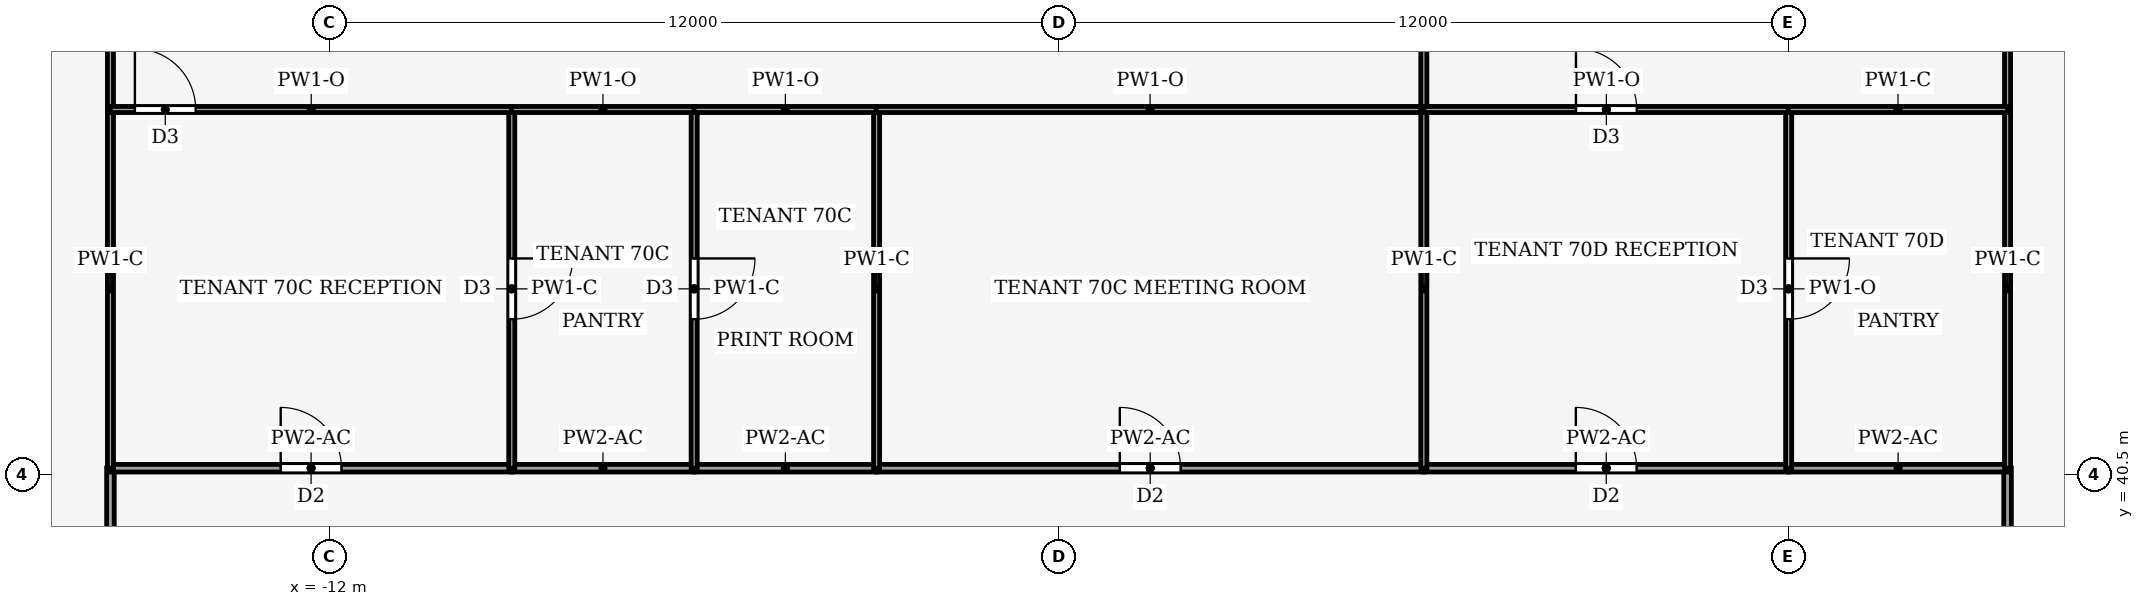
"""IFC4 building model, lengths in metres.
Left out: names, types, materials, properties, quantities, classifications, styles, units other than length and angle.
Written with IfcOpenShell. Run it as: python <this file> out.ifc"""

import sys

from ifc_helpers import new_model, si_unit, direction, frame, frame_2d, origin, place, context, subcontext, project, spatial, rectangle, extrude, element, fill, save


model = new_model("IFC4")
c1 = context("Model", 3, precision=1e-05, world=origin(), true_north=direction((0.0, 1.0)))
c2 = subcontext(c1, "Body", "Model", "MODEL_VIEW")
j1 = project(units=[si_unit("LENGTHUNIT", "METRE"), si_unit("PLANEANGLEUNIT", "RADIAN")], contexts=[c1])
p1 = place(None, origin())
s1 = spatial("IfcSite", under=j1, at=p1, CompositionType="ELEMENT")
p2 = place(p1, origin())
s2 = spatial("IfcBuilding", under=s1, at=p2, CompositionType="ELEMENT")
p3 = place(p2, frame((0.0, 0.0, 306.0)))
s3 = spatial("IfcBuildingStorey", under=s2, at=p3, CompositionType="ELEMENT", Elevation=306.0)
p4 = place(p3, frame((-15.6, 34.5, 0.0), z_axis=(0.0, 0.0, 1.0), x_axis=(0.0, 1.0, 0.0)))
e1 = element("IfcWall", 1, at=p4, inside=s3, PredefinedType="PARTITIONING", context=c2, shape_type="SweptSolid", body=[
    extrude(rectangle(XDim=6.104, YDim=0.125, at=frame_2d((3.052, 0.0))), origin(), (0.0, 0.0, 1.0), 3.14),
])
p5 = place(p4, frame((2.552, 0.0, 0.0)))
e2 = element("IfcOpeningElement", 2, at=p5, cuts=e1, PredefinedType="OPENING", context=c2, shape_type="SweptSolid", body=[
    extrude(rectangle(XDim=1.0, YDim=2.1, at=frame_2d((0.5, 1.05))), frame((0.0, 0.073, 0.0), z_axis=(0.0, -1.0, 0.0), x_axis=(1.0, 0.0, 0.0)), (0.0, 0.0, 1.0), 0.145),
])
p6 = place(p3, frame((15.6, 40.604, 0.0), z_axis=(0.0, 0.0, 1.0), x_axis=(0.0, -1.0, 0.0)))
e3 = element("IfcWall", 3, at=p6, inside=s3, PredefinedType="PARTITIONING", context=c2, shape_type="SweptSolid", body=[
    extrude(rectangle(XDim=6.104, YDim=0.125, at=frame_2d((3.052, 0.0))), origin(), (0.0, 0.0, 1.0), 3.14),
])
p7 = place(p6, frame((2.552, 0.0, 0.0)))
e4 = element("IfcOpeningElement", 4, at=p7, cuts=e3, PredefinedType="OPENING", context=c2, shape_type="SweptSolid", body=[
    extrude(rectangle(XDim=1.0, YDim=2.1, at=frame_2d((0.5, 1.05))), frame((0.0, 0.073, 0.0), z_axis=(0.0, -1.0, 0.0), x_axis=(1.0, 0.0, 0.0)), (0.0, 0.0, 1.0), 0.145),
])
p8 = place(p3, frame((-15.6, 40.6, 0.0), z_axis=(0.0, 0.0, 1.0), x_axis=(1.0, 0.0, 0.0)))
e5 = element("IfcWall", 5, at=p8, inside=s3, PredefinedType="PARTITIONING", context=c2, shape_type="SweptSolid", body=[
    extrude(rectangle(XDim=6.6, YDim=0.125, at=frame_2d((3.3, 0.0))), origin(), (0.0, 0.0, 1.0), 3.39),
])
p9 = place(p8, frame((2.8, 0.0, 0.0)))
e6 = element("IfcOpeningElement", 6, at=p9, cuts=e5, PredefinedType="OPENING", context=c2, shape_type="SweptSolid", body=[
    extrude(rectangle(XDim=1.0, YDim=2.1, at=frame_2d((0.5, 1.05))), frame((0.0, 0.073, 0.0), z_axis=(0.0, -1.0, 0.0), x_axis=(1.0, 0.0, 0.0)), (0.0, 0.0, 1.0), 0.145),
])
for number, where, z_axis, x_axis in (
    (7, (-6.0, 40.6, 0.0), (0.0, 0.0, 1.0), (-1.0, 0.0, 0.0)),
    (8, (-3.0, 40.6, 0.0), (0.0, 0.0, 1.0), (-1.0, 0.0, 0.0)),
):
    element("IfcWall", number, at=place(p3, frame(where, z_axis=z_axis, x_axis=x_axis)), inside=s3, PredefinedType="PARTITIONING", context=c2, shape_type="SweptSolid", body=[
        extrude(rectangle(XDim=3.0, YDim=0.125, at=frame_2d((1.5, 0.0))), origin(), (0.0, 0.0, 1.0), 3.39),
    ])
p10 = place(p3, frame((-3.0, 40.6, 0.0), z_axis=(0.0, 0.0, 1.0), x_axis=(1.0, 0.0, 0.0)))
e9 = element("IfcWall", 9, at=p10, inside=s3, PredefinedType="PARTITIONING", context=c2, shape_type="SweptSolid", body=[
    extrude(rectangle(XDim=9.0, YDim=0.125, at=frame_2d((4.5, 0.0))), origin(), (0.0, 0.0, 1.0), 3.39),
])
p11 = place(p10, frame((4.0, 0.0, 0.0)))
e10 = element("IfcOpeningElement", 10, at=p11, cuts=e9, PredefinedType="OPENING", context=c2, shape_type="SweptSolid", body=[
    extrude(rectangle(XDim=1.0, YDim=2.1, at=frame_2d((0.5, 1.05))), frame((0.0, 0.073, 0.0), z_axis=(0.0, -1.0, 0.0), x_axis=(1.0, 0.0, 0.0)), (0.0, 0.0, 1.0), 0.145),
])
p12 = place(p3, frame((6.0, 40.6, 0.0), z_axis=(0.0, 0.0, 1.0), x_axis=(1.0, 0.0, 0.0)))
e11 = element("IfcWall", 11, at=p12, inside=s3, PredefinedType="PARTITIONING", context=c2, shape_type="SweptSolid", body=[
    extrude(rectangle(XDim=6.0, YDim=0.125, at=frame_2d((3.0, 0.0))), origin(), (0.0, 0.0, 1.0), 3.39),
])
p13 = place(p12, frame((2.5, 0.0, 0.0)))
e12 = element("IfcOpeningElement", 12, at=p13, cuts=e11, PredefinedType="OPENING", context=c2, shape_type="SweptSolid", body=[
    extrude(rectangle(XDim=1.0, YDim=2.1, at=frame_2d((0.5, 1.05))), frame((0.0, 0.073, 0.0), z_axis=(0.0, -1.0, 0.0), x_axis=(1.0, 0.0, 0.0)), (0.0, 0.0, 1.0), 0.145),
])
p14 = place(p3, frame((15.6, 40.6, 0.0), z_axis=(0.0, 0.0, 1.0), x_axis=(-1.0, 0.0, 0.0)))
e13 = element("IfcWall", 13, at=p14, inside=s3, PredefinedType="PARTITIONING", context=c2, shape_type="SweptSolid", body=[
    extrude(rectangle(XDim=3.6, YDim=0.125, at=frame_2d((1.8, 0.0))), origin(), (0.0, 0.0, 1.0), 3.39),
])
p15 = place(p3, frame((-15.6, 40.6, 0.0), z_axis=(0.0, 0.0, 1.0), x_axis=(0.0, 1.0, 0.0)))
e14 = element("IfcWall", 14, at=p15, inside=s3, PredefinedType="PARTITIONING", context=c2, shape_type="SweptSolid", body=[
    extrude(rectangle(XDim=5.9, YDim=0.1, at=frame_2d((2.95, 0.0))), origin(), (0.0, 0.0, 1.0), 3.87),
])
p16 = place(p3, frame((-15.6, 46.5, 0.0), z_axis=(0.0, 0.0, 1.0), x_axis=(0.0, 1.0, 0.0)))
e15 = element("IfcWall", 15, at=p16, inside=s3, PredefinedType="PARTITIONING", context=c2, shape_type="SweptSolid", body=[
    extrude(rectangle(XDim=15.0, YDim=0.1, at=frame_2d((7.5, 0.0))), origin(), (0.0, 0.0, 1.0), 3.35),
])
p17 = place(p3, frame((15.6, 46.5, 0.0), z_axis=(0.0, 0.0, 1.0), x_axis=(0.0, -1.0, 0.0)))
e16 = element("IfcWall", 16, at=p17, inside=s3, PredefinedType="PARTITIONING", context=c2, shape_type="SweptSolid", body=[
    extrude(rectangle(XDim=5.9, YDim=0.1, at=frame_2d((2.95, 0.0))), origin(), (0.0, 0.0, 1.0), 3.87),
])
p18 = place(p3, frame((15.6, 61.5, 0.0), z_axis=(0.0, 0.0, 1.0), x_axis=(0.0, -1.0, 0.0)))
e17 = element("IfcWall", 17, at=p18, inside=s3, PredefinedType="PARTITIONING", context=c2, shape_type="SweptSolid", body=[
    extrude(rectangle(XDim=15.0, YDim=0.1, at=frame_2d((7.5, 0.0))), origin(), (0.0, 0.0, 1.0), 3.35),
])
p19 = place(p3, frame((-9.0, 46.5, 0.0), z_axis=(0.0, 0.0, 1.0), x_axis=(0.0, -1.0, 0.0)))
e18 = element("IfcWall", 18, at=p19, inside=s3, PredefinedType="PARTITIONING", context=c2, shape_type="SweptSolid", body=[
    extrude(rectangle(XDim=5.9, YDim=0.1, at=frame_2d((2.95, 0.0))), origin(), (0.0, 0.0, 1.0), 3.87),
])
p20 = place(p19, frame((2.45, 0.0, 0.0)))
e19 = element("IfcOpeningElement", 19, at=p20, cuts=e18, PredefinedType="OPENING", context=c2, shape_type="SweptSolid", body=[
    extrude(rectangle(XDim=1.0, YDim=2.1, at=frame_2d((0.5, 1.05))), frame((0.0, 0.06, 0.0), z_axis=(0.0, -1.0, 0.0), x_axis=(1.0, 0.0, 0.0)), (0.0, 0.0, 1.0), 0.12),
])
p21 = place(p3, frame((-15.6, 46.5, 0.0), z_axis=(0.0, 0.0, 1.0), x_axis=(1.0, 0.0, 0.0)))
e20 = element("IfcWall", 20, at=p21, inside=s3, PredefinedType="PARTITIONING", context=c2, shape_type="SweptSolid", body=[
    extrude(rectangle(XDim=6.604, YDim=0.1, at=frame_2d((3.302, 0.0))), origin(), (0.0, 0.0, 1.0), 3.39),
])
p22 = place(p21, frame((0.402, 0.0, 0.0)))
e21 = element("IfcOpeningElement", 21, at=p22, cuts=e20, PredefinedType="OPENING", context=c2, shape_type="SweptSolid", body=[
    extrude(rectangle(XDim=1.0, YDim=2.1, at=frame_2d((0.5, 1.05))), frame((0.0, 0.06, 0.0), z_axis=(0.0, -1.0, 0.0), x_axis=(1.0, 0.0, 0.0)), (0.0, 0.0, 1.0), 0.12),
])
p23 = place(p3, frame((-6.0, 46.5, 0.0), z_axis=(0.0, 0.0, 1.0), x_axis=(0.0, -1.0, 0.0)))
e22 = element("IfcWall", 22, at=p23, inside=s3, PredefinedType="PARTITIONING", context=c2, shape_type="SweptSolid", body=[
    extrude(rectangle(XDim=5.9, YDim=0.1, at=frame_2d((2.95, 0.0))), origin(), (0.0, 0.0, 1.0), 3.87),
])
p24 = place(p23, frame((2.45, 0.0, 0.0)))
e23 = element("IfcOpeningElement", 23, at=p24, cuts=e22, PredefinedType="OPENING", context=c2, shape_type="SweptSolid", body=[
    extrude(rectangle(XDim=1.0, YDim=2.1, at=frame_2d((0.5, 1.05))), frame((0.0, 0.06, 0.0), z_axis=(0.0, -1.0, 0.0), x_axis=(1.0, 0.0, 0.0)), (0.0, 0.0, 1.0), 0.12),
])
p25 = place(p3, frame((-5.996, 46.5, 0.0), z_axis=(0.0, 0.0, 1.0), x_axis=(-1.0, 0.0, 0.0)))
e24 = element("IfcWall", 24, at=p25, inside=s3, PredefinedType="PARTITIONING", context=c2, shape_type="SweptSolid", body=[
    extrude(rectangle(XDim=3.008, YDim=0.1, at=frame_2d((1.504, 0.0))), origin(), (0.0, 0.0, 1.0), 3.39),
])
p26 = place(p3, frame((-3.0, 40.6, 0.0), z_axis=(0.0, 0.0, 1.0), x_axis=(0.0, 1.0, 0.0)))
e25 = element("IfcWall", 25, at=p26, inside=s3, PredefinedType="PARTITIONING", context=c2, shape_type="SweptSolid", body=[
    extrude(rectangle(XDim=5.9, YDim=0.1, at=frame_2d((2.95, 0.0))), origin(), (0.0, 0.0, 1.0), 3.87),
])
p27 = place(p3, frame((-2.996, 46.5, 0.0), z_axis=(0.0, 0.0, 1.0), x_axis=(-1.0, 0.0, 0.0)))
e26 = element("IfcWall", 26, at=p27, inside=s3, PredefinedType="PARTITIONING", context=c2, shape_type="SweptSolid", body=[
    extrude(rectangle(XDim=3.008, YDim=0.1, at=frame_2d((1.504, 0.0))), origin(), (0.0, 0.0, 1.0), 3.39),
])
p28 = place(p3, frame((6.0, 46.5, 0.0), z_axis=(0.0, 0.0, 1.0), x_axis=(-1.0, 0.0, 0.0)))
e27 = element("IfcWall", 27, at=p28, inside=s3, PredefinedType="PARTITIONING", context=c2, shape_type="SweptSolid", body=[
    extrude(rectangle(XDim=9.004, YDim=0.1, at=frame_2d((4.502, 0.0))), origin(), (0.0, 0.0, 1.0), 3.39),
])
p29 = place(p3, frame((6.0, 40.6, 0.0), z_axis=(0.0, 0.0, 1.0), x_axis=(0.0, 1.0, 0.0)))
e28 = element("IfcWall", 28, at=p29, inside=s3, PredefinedType="PARTITIONING", context=c2, shape_type="SweptSolid", body=[
    extrude(rectangle(XDim=5.9, YDim=0.1, at=frame_2d((2.95, 0.0))), origin(), (0.0, 0.0, 1.0), 3.87),
])
p30 = place(p3, frame((6.0, 46.5, 0.0), z_axis=(0.0, 0.0, 1.0), x_axis=(0.0, 1.0, 0.0)))
e29 = element("IfcWall", 29, at=p30, inside=s3, PredefinedType="PARTITIONING", context=c2, shape_type="SweptSolid", body=[
    extrude(rectangle(XDim=15.0, YDim=0.1, at=frame_2d((7.5, 0.0))), origin(), (0.0, 0.0, 1.0), 3.24),
])
p31 = place(p3, frame((12.0, 46.5, 0.0), z_axis=(0.0, 0.0, 1.0), x_axis=(0.0, -1.0, 0.0)))
e30 = element("IfcWall", 30, at=p31, inside=s3, PredefinedType="PARTITIONING", context=c2, shape_type="SweptSolid", body=[
    extrude(rectangle(XDim=5.9, YDim=0.1, at=frame_2d((2.95, 0.0))), origin(), (0.0, 0.0, 1.0), 3.39),
])
p32 = place(p31, frame((2.45, 0.0, 0.0)))
e31 = element("IfcOpeningElement", 31, at=p32, cuts=e30, PredefinedType="OPENING", context=c2, shape_type="SweptSolid", body=[
    extrude(rectangle(XDim=1.0, YDim=2.1, at=frame_2d((0.5, 1.05))), frame((0.0, 0.06, 0.0), z_axis=(0.0, -1.0, 0.0), x_axis=(1.0, 0.0, 0.0)), (0.0, 0.0, 1.0), 0.12),
])
p33 = place(p3, frame((6.0, 46.5, 0.0), z_axis=(0.0, 0.0, 1.0), x_axis=(1.0, 0.0, 0.0)))
e32 = element("IfcWall", 32, at=p33, inside=s3, PredefinedType="PARTITIONING", context=c2, shape_type="SweptSolid", body=[
    extrude(rectangle(XDim=6.004, YDim=0.1, at=frame_2d((3.002, 0.0))), origin(), (0.0, 0.0, 1.0), 3.39),
])
p34 = place(p33, frame((2.502, 0.0, 0.0)))
e33 = element("IfcOpeningElement", 33, at=p34, cuts=e32, PredefinedType="OPENING", context=c2, shape_type="SweptSolid", body=[
    extrude(rectangle(XDim=1.0, YDim=2.1, at=frame_2d((0.5, 1.05))), frame((0.0, 0.06, 0.0), z_axis=(0.0, -1.0, 0.0), x_axis=(1.0, 0.0, 0.0)), (0.0, 0.0, 1.0), 0.12),
])
p35 = place(p3, frame((15.6, 46.5, 0.0), z_axis=(0.0, 0.0, 1.0), x_axis=(-1.0, 0.0, 0.0)))
e34 = element("IfcWall", 34, at=p35, inside=s3, PredefinedType="PARTITIONING", context=c2, shape_type="SweptSolid", body=[
    extrude(rectangle(XDim=3.604, YDim=0.1, at=frame_2d((1.802, 0.0))), origin(), (0.0, 0.0, 1.0), 3.87),
])
p36 = place(p9, origin())
e35 = element("IfcDoor", 35, at=p36, inside=s3, OperationType="SINGLE_SWING_RIGHT", PredefinedType="DOOR", context=c2, shape_type="SweptSolid", body=[
    extrude(rectangle(XDim=1.0, YDim=2.1, at=frame_2d((0.5, 1.05))), frame((0.0, 0.025, 0.0), z_axis=(0.0, -1.0, 0.0), x_axis=(1.0, 0.0, 0.0)), (0.0, 0.0, 1.0), 0.05),
])
fill(e6, e35)
p37 = place(p11, origin())
e36 = element("IfcDoor", 36, at=p37, inside=s3, OperationType="SINGLE_SWING_LEFT", PredefinedType="DOOR", context=c2, shape_type="SweptSolid", body=[
    extrude(rectangle(XDim=1.0, YDim=2.1, at=frame_2d((0.5, 1.05))), frame((0.0, 0.025, 0.0), z_axis=(0.0, -1.0, 0.0), x_axis=(1.0, 0.0, 0.0)), (0.0, 0.0, 1.0), 0.05),
])
fill(e10, e36)
p38 = place(p13, origin())
e37 = element("IfcDoor", 37, at=p38, inside=s3, OperationType="SINGLE_SWING_RIGHT", PredefinedType="DOOR", context=c2, shape_type="SweptSolid", body=[
    extrude(rectangle(XDim=1.0, YDim=2.1, at=frame_2d((0.5, 1.05))), frame((0.0, 0.025, 0.0), z_axis=(0.0, -1.0, 0.0), x_axis=(1.0, 0.0, 0.0)), (0.0, 0.0, 1.0), 0.05),
])
fill(e12, e37)
p39 = place(p20, origin())
e38 = element("IfcDoor", 38, at=p39, inside=s3, OperationType="SINGLE_SWING_LEFT", PredefinedType="DOOR", context=c2, shape_type="SweptSolid", body=[
    extrude(rectangle(XDim=1.0, YDim=2.1, at=frame_2d((0.5, 1.05))), frame((0.0, 0.025, 0.0), z_axis=(0.0, -1.0, 0.0), x_axis=(1.0, 0.0, 0.0)), (0.0, 0.0, 1.0), 0.05),
])
fill(e19, e38)
p40 = place(p22, origin())
e39 = element("IfcDoor", 39, at=p40, inside=s3, OperationType="SINGLE_SWING_LEFT", PredefinedType="DOOR", context=c2, shape_type="SweptSolid", body=[
    extrude(rectangle(XDim=1.0, YDim=2.1, at=frame_2d((0.5, 1.05))), frame((0.0, 0.025, 0.0), z_axis=(0.0, -1.0, 0.0), x_axis=(1.0, 0.0, 0.0)), (0.0, 0.0, 1.0), 0.05),
])
fill(e21, e39)
p41 = place(p24, origin())
e40 = element("IfcDoor", 40, at=p41, inside=s3, OperationType="SINGLE_SWING_LEFT", PredefinedType="DOOR", context=c2, shape_type="SweptSolid", body=[
    extrude(rectangle(XDim=1.0, YDim=2.1, at=frame_2d((0.5, 1.05))), frame((0.0, 0.025, 0.0), z_axis=(0.0, -1.0, 0.0), x_axis=(1.0, 0.0, 0.0)), (0.0, 0.0, 1.0), 0.05),
])
fill(e23, e40)
p42 = place(p32, origin())
e41 = element("IfcDoor", 41, at=p42, inside=s3, OperationType="SINGLE_SWING_LEFT", PredefinedType="DOOR", context=c2, shape_type="SweptSolid", body=[
    extrude(rectangle(XDim=1.0, YDim=2.1, at=frame_2d((0.5, 1.05))), frame((0.0, 0.025, 0.0), z_axis=(0.0, -1.0, 0.0), x_axis=(1.0, 0.0, 0.0)), (0.0, 0.0, 1.0), 0.05),
])
fill(e31, e41)
p43 = place(p34, origin())
e42 = element("IfcDoor", 42, at=p43, inside=s3, OperationType="SINGLE_SWING_RIGHT", PredefinedType="DOOR", context=c2, shape_type="SweptSolid", body=[
    extrude(rectangle(XDim=1.0, YDim=2.1, at=frame_2d((0.5, 1.05))), frame((0.0, 0.025, 0.0), z_axis=(0.0, -1.0, 0.0), x_axis=(1.0, 0.0, 0.0)), (0.0, 0.0, 1.0), 0.05),
])
fill(e33, e42)
save(model, sys.argv[1])
